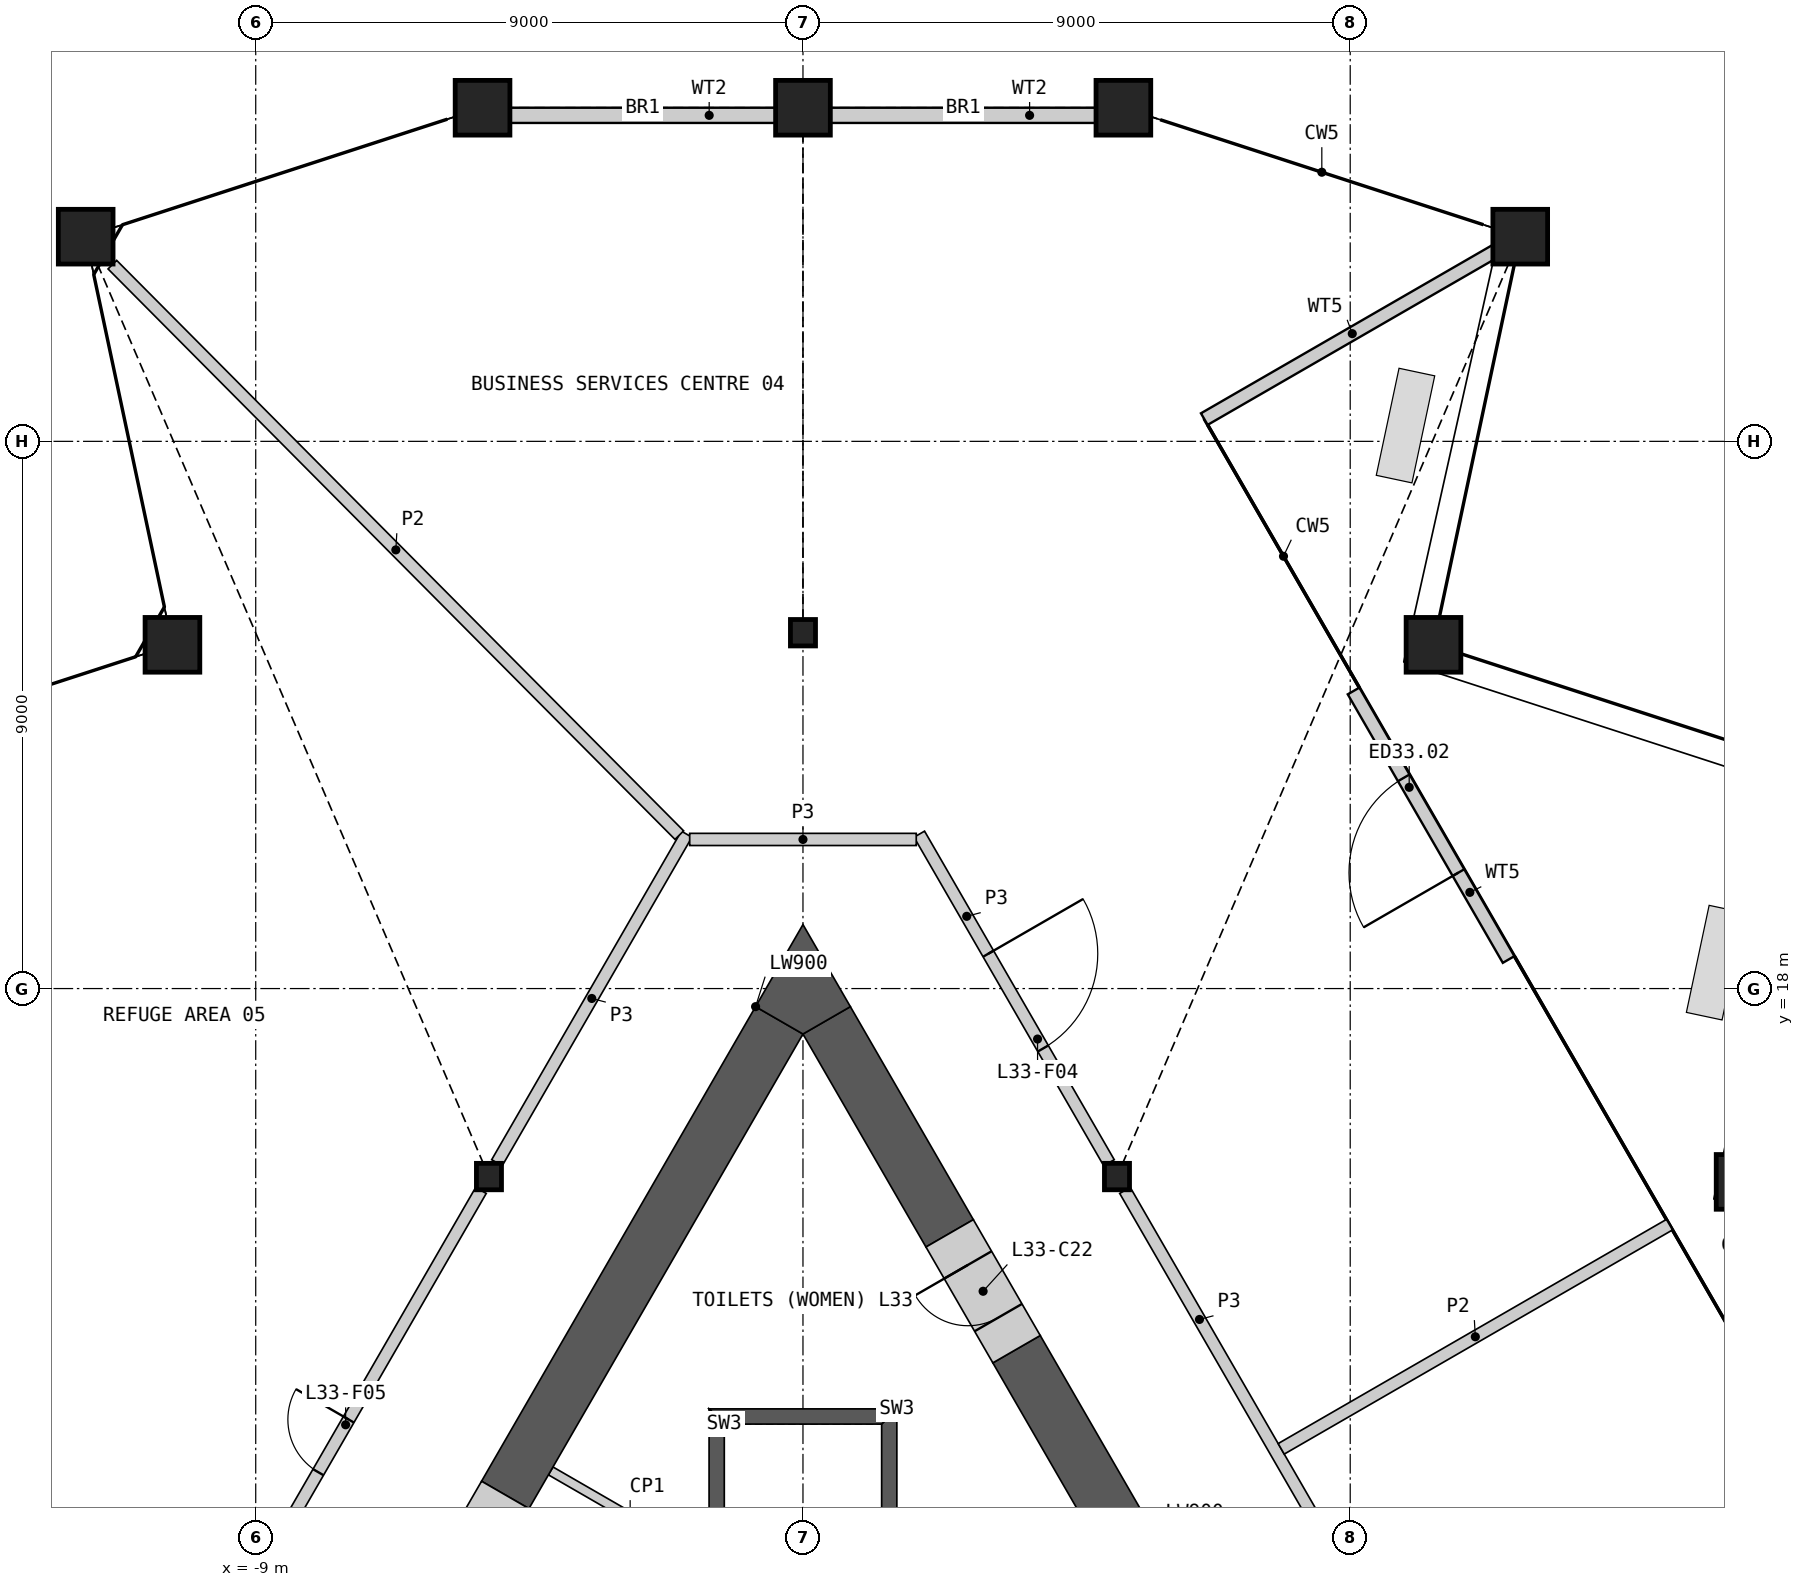
"""IFC4 building model, lengths in metres.
Left out: names, types, materials, properties, quantities, classifications, styles, units other than length and angle.
Written with IfcOpenShell. Run it as: python <this file> out.ifc"""

import sys

from ifc_helpers import new_model, si_unit, direction, frame, frame_2d, origin, origin_2d, place, context, subcontext, project, spatial, polyline, rectangle, hollow_rectangle, i_section, outline, extrude, element, fill, save


model = new_model("IFC4")
c1 = context("Model", 3, precision=1e-05, world=origin(), true_north=direction((0.0, 1.0)))
c2 = subcontext(c1, "Body", "Model", "MODEL_VIEW")
j1 = project(units=[si_unit("LENGTHUNIT", "METRE"), si_unit("PLANEANGLEUNIT", "RADIAN")], contexts=[c1])
p1 = place(None, origin())
s1 = spatial("IfcSite", under=j1, at=p1, CompositionType="ELEMENT")
p2 = place(p1, origin())
s2 = spatial("IfcBuilding", under=s1, at=p2, CompositionType="ELEMENT")
p3 = place(p2, frame((0.0, 0.0, 154.2)))
s3 = spatial("IfcBuildingStorey", under=s2, at=p3, CompositionType="ELEMENT", Elevation=154.2)
for number, where, z_axis, x_axis in (
    (1, (15.469, 14.82, 0.0), (0.0, 0.0, 1.0), (1.0, 0.0, 0.0)),
    (2, (10.37, 23.654, 0.0), (0.0, 0.0, 1.0), (1.0, 0.0, 0.0)),
    (3, (11.796, 30.366, 0.0), (0.0, 0.0, 1.0), (1.0, 0.0, 0.0)),
    (4, (5.27, 32.487, 0.0), (0.0, 0.0, 1.0), (1.0, 0.0, 0.0)),
    (5, (0.0, 32.487, 0.0), (0.0, 0.0, 1.0), (1.0, 0.0, 0.0)),
    (6, (-5.27, 32.487, 0.0), (0.0, 0.0, 1.0), (1.0, 0.0, 0.0)),
    (7, (-11.796, 30.366, 0.0), (0.0, 0.0, 1.0), (1.0, 0.0, 0.0)),
    (8, (-10.37, 23.654, 0.0), (0.0, 0.0, 1.0), (1.0, 0.0, 0.0)),
):
    element("IfcColumn", number, at=place(p3, frame(where, z_axis=z_axis, x_axis=x_axis)), inside=s3, PredefinedType="COLUMN", context=c2, shape_type="SweptSolid", body=[
        extrude(hollow_rectangle(XDim=0.9, YDim=0.9, WallThickness=0.06, at=origin_2d()), origin(), (0.0, 0.0, 1.0), 10.0),
    ])
for number, where, z_axis, x_axis in (
    (9, (0.0, 23.853, 0.0), (0.0, 0.0, 1.0), (1.0, 0.0, 0.0)),
    (10, (-5.164, 14.908, 0.0), (0.0, 0.0, 1.0), (1.0, 0.0, 0.0)),
    (11, (5.164, 14.908, 0.0), (0.0, 0.0, 1.0), (1.0, 0.0, 0.0)),
):
    element("IfcColumn", number, at=place(p3, frame(where, z_axis=z_axis, x_axis=x_axis)), inside=s3, PredefinedType="COLUMN", context=c2, shape_type="SweptSolid", body=[
        extrude(i_section(OverallWidth=0.412, OverallDepth=0.435, WebThickness=0.036, FlangeThickness=0.057, at=origin_2d()), origin(), (0.0, 0.0, 1.0), 10.0),
    ])
for number, where, z_axis, x_axis in (
    (12, (4.82, 32.362, 0.0), (0.0, 0.0, 1.0), (-1.0, 0.0, 0.0)),
    (13, (-0.45, 32.362, 0.0), (0.0, 0.0, 1.0), (-1.0, 0.0, 0.0)),
):
    element("IfcWall", number, at=place(p3, frame(where, z_axis=z_axis, x_axis=x_axis)), inside=s3, PredefinedType="SOLIDWALL", context=c2, shape_type="SweptSolid", body=[
        extrude(rectangle(XDim=4.37, YDim=0.25, at=frame_2d((2.185, 0.0))), origin(), (0.0, 0.0, 1.0), 8.989),
    ])
p4 = place(p3, frame((11.605, 18.478, 0.0), z_axis=(0.0, 0.0, 1.0), x_axis=(-0.500026340207, 0.866010195725, 0.0)))
e14 = element("IfcWall", 14, at=p4, inside=s3, PredefinedType="SOLIDWALL", context=c2, shape_type="SweptSolid", body=[
    extrude(rectangle(XDim=5.1, YDim=0.22, at=frame_2d((2.55, 0.0))), origin(), (0.0, 0.0, 1.0), 8.989),
])
p5 = place(p4, frame((1.65, 0.0, 0.0)))
e15 = element("IfcOpeningElement", 15, at=p5, cuts=e14, PredefinedType="OPENING", context=c2, shape_type="SweptSolid", body=[
    extrude(rectangle(XDim=1.8, YDim=2.4, at=frame_2d((0.9, 1.2))), frame((0.0, 0.12, 0.0), z_axis=(0.0, -1.0, 0.0), x_axis=(1.0, 0.0, 0.0)), (0.0, 0.0, 1.0), 0.24),
])
p6 = place(p3, frame((11.467, 30.176, 0.0), z_axis=(0.0, 0.0, 1.0), x_axis=(-0.866015577098, -0.500017019934, 0.0)))
e16 = element("IfcWall", 16, at=p6, inside=s3, PredefinedType="SOLIDWALL", context=c2, shape_type="SweptSolid", body=[
    extrude(rectangle(XDim=5.62, YDim=0.22, at=frame_2d((2.81, 0.0))), origin(), (0.0, 0.0, 1.0), 8.989),
])
p7 = place(p3, origin())
e17 = element("IfcWall", 17, at=p7, inside=s3, PredefinedType="SHEAR", context=c2, shape_type="SweptSolid", body=[
    extrude(outline(polyline([(1.544, 5.237), (1.544, 11.087), (1.294, 10.837), (1.294, 5.237), (1.544, 5.237)])), origin(), (0.0, 0.0, 1.0), 9.6),
])
p8 = place(p3, origin())
e18 = element("IfcWall", 18, at=p8, inside=s3, PredefinedType="SHEAR", context=c2, shape_type="SweptSolid", body=[
    extrude(outline(polyline([(1.544, 11.087), (-1.544, 11.087), (-1.294, 10.837), (1.294, 10.837), (1.544, 11.087)])), origin(), (0.0, 0.0, 1.0), 9.6),
])
p9 = place(p3, origin())
e19 = element("IfcWall", 19, at=p9, inside=s3, PredefinedType="SHEAR", context=c2, shape_type="SweptSolid", body=[
    extrude(outline(polyline([(-1.294, 10.837), (-1.544, 11.087), (-1.544, 5.237), (-1.294, 5.237), (-1.294, 10.837)])), origin(), (0.0, 0.0, 1.0), 9.6),
])
p10 = place(p3, frame((-4.149, 10.067, 0.0), z_axis=(0.0, 0.0, 1.0), x_axis=(0.865988872794, -0.500063268193, 0.0)))
e20 = element("IfcWall", 20, at=p10, inside=s3, PredefinedType="PARTITIONING", context=c2, shape_type="SweptSolid", body=[
    extrude(rectangle(XDim=3.018, YDim=0.15, at=frame_2d((1.509, 0.0))), origin(), (0.0, 0.0, 1.0), 9.6),
])
p11 = place(p3, frame((7.31, 5.491, 0.0), z_axis=(0.0, 0.0, 1.0), x_axis=(-0.499996970966, 0.866027152591, 0.0)))
e21 = element("IfcWall", 21, at=p11, inside=s3, PredefinedType="SHEAR", context=c2, shape_type="SweptSolid", body=[
    extrude(rectangle(XDim=7.596, YDim=0.9, at=frame_2d((3.798, 0.0))), origin(), (0.0, 0.0, 1.0), 9.6),
])
p12 = place(p3, frame((2.413, 13.974, 0.0), z_axis=(0.0, 0.0, 1.0), x_axis=(-0.500046330384, 0.865998653272, 0.0)))
e22 = element("IfcWall", 22, at=p12, inside=s3, PredefinedType="SHEAR", context=c2, shape_type="SweptSolid", body=[
    extrude(rectangle(XDim=4.045, YDim=0.9, at=frame_2d((2.023, 0.0))), origin(), (0.0, 0.0, 1.0), 9.6),
])
p13 = place(p3, frame((-0.39, 17.478, 0.0), z_axis=(0.0, 0.0, 1.0), x_axis=(-0.499999130374, -0.866025905863, 0.0)))
e23 = element("IfcWall", 23, at=p13, inside=s3, PredefinedType="SHEAR", context=c2, shape_type="SweptSolid", body=[
    extrude(rectangle(XDim=9.013, YDim=0.9, at=frame_2d((4.507, 0.0))), origin(), (0.0, 0.0, 1.0), 9.6),
])
p14 = place(p3, origin())
e24 = element("IfcWall", 24, at=p14, inside=s3, PredefinedType="SHEAR", context=c2, shape_type="SweptSolid", body=[
    extrude(outline(polyline([(-0.779, 17.703), (0.0, 19.052), (0.779, 17.703), (0.0, 17.253), (-0.779, 17.703)])), origin(), (0.0, 0.0, 1.0), 9.6),
])
p15 = place(p3, frame((-4.896, 9.672, 0.0), z_axis=(0.0, 0.0, 1.0), x_axis=(-0.50002983664, -0.866008176907, 0.0)))
e25 = element("IfcWall", 25, at=p15, inside=s3, PredefinedType="SHEAR", context=c2, shape_type="SweptSolid", body=[
    extrude(rectangle(XDim=2.2, YDim=0.9, at=frame_2d((1.1, 0.0))), origin(), (0.0, 0.0, 1.0), 9.6),
])
p16 = place(p15, frame((0.6, 0.0, 0.0)))
e26 = element("IfcOpeningElement", 26, at=p16, cuts=e25, PredefinedType="OPENING", context=c2, shape_type="SweptSolid", body=[
    extrude(rectangle(XDim=1.0, YDim=2.1, at=frame_2d((0.5, 1.05))), frame((0.0, 0.46, 0.0), z_axis=(0.0, -1.0, 0.0), x_axis=(1.0, 0.0, 0.0)), (0.0, 0.0, 1.0), 0.92),
])
p17 = place(p3, frame((3.512, 12.069, 0.0), z_axis=(0.0, 0.0, 1.0), x_axis=(-0.499946605688, 0.86605622881, 0.0)))
e27 = element("IfcWall", 27, at=p17, inside=s3, PredefinedType="SHEAR", context=c2, shape_type="SweptSolid", body=[
    extrude(rectangle(XDim=2.2, YDim=0.9, at=frame_2d((1.1, 0.0))), origin(), (0.0, 0.0, 1.0), 9.6),
])
p18 = place(p17, frame((0.6, 0.0, 0.0)))
e28 = element("IfcOpeningElement", 28, at=p18, cuts=e27, PredefinedType="OPENING", context=c2, shape_type="SweptSolid", body=[
    extrude(rectangle(XDim=1.0, YDim=2.1, at=frame_2d((0.5, 1.05))), frame((0.0, 0.46, 0.0), z_axis=(0.0, -1.0, 0.0), x_axis=(1.0, 0.0, 0.0)), (0.0, 0.0, 1.0), 0.92),
])
p19 = place(p3, frame((-10.197, 6.19, 0.0), z_axis=(0.0, 0.0, 1.0), x_axis=(0.500012035596, 0.866018454918, 0.0)))
e29 = element("IfcWall", 29, at=p19, inside=s3, PredefinedType="PARTITIONING", context=c2, shape_type="SweptSolid", body=[
    extrude(rectangle(XDim=9.803, YDim=0.2, at=frame_2d((4.902, 0.0))), origin(), (0.0, 0.0, 1.0), 9.6),
])
p20 = place(p19, frame((4.452, 0.0, 0.0)))
e30 = element("IfcOpeningElement", 30, at=p20, cuts=e29, PredefinedType="OPENING", context=c2, shape_type="SweptSolid", body=[
    extrude(rectangle(XDim=1.0, YDim=2.1, at=frame_2d((0.5, 1.05))), frame((0.0, 0.11, 0.0), z_axis=(0.0, -1.0, 0.0), x_axis=(1.0, 0.0, 0.0)), (0.0, 0.0, 1.0), 0.22),
])
p21 = place(p3, frame((5.295, 14.68, 0.0), z_axis=(0.0, 0.0, 1.0), x_axis=(0.500012035596, -0.866018454918, 0.0)))
e31 = element("IfcWall", 31, at=p21, inside=s3, PredefinedType="PARTITIONING", context=c2, shape_type="SweptSolid", body=[
    extrude(rectangle(XDim=9.803, YDim=0.2, at=frame_2d((4.902, 0.0))), origin(), (0.0, 0.0, 1.0), 9.6),
])
p22 = place(p3, frame((-5.033, 15.135, 0.0), z_axis=(0.0, 0.0, 1.0), x_axis=(0.499980978912, 0.866036385336, 0.0)))
e32 = element("IfcWall", 32, at=p22, inside=s3, PredefinedType="PARTITIONING", context=c2, shape_type="SweptSolid", body=[
    extrude(rectangle(XDim=6.24, YDim=0.2, at=frame_2d((3.12, 0.0))), origin(), (0.0, 0.0, 1.0), 9.6),
])
p23 = place(p3, frame((1.913, 20.539, 0.0), z_axis=(0.0, 0.0, 1.0), x_axis=(0.499980978912, -0.866036385336, 0.0)))
e33 = element("IfcWall", 33, at=p23, inside=s3, PredefinedType="PARTITIONING", context=c2, shape_type="SweptSolid", body=[
    extrude(rectangle(XDim=6.24, YDim=0.2, at=frame_2d((3.12, 0.0))), origin(), (0.0, 0.0, 1.0), 9.6),
])
p24 = place(p23, frame((2.271, 0.0, 0.0)))
e34 = element("IfcOpeningElement", 34, at=p24, cuts=e33, PredefinedType="OPENING", context=c2, shape_type="SweptSolid", body=[
    extrude(rectangle(XDim=1.8, YDim=2.1, at=frame_2d((0.9, 1.05))), frame((0.0, 0.11, 0.0), z_axis=(0.0, -1.0, 0.0), x_axis=(1.0, 0.0, 0.0)), (0.0, 0.0, 1.0), 0.22),
])
p25 = place(p3, frame((-1.863, 20.453, 0.0), z_axis=(0.0, 0.0, 1.0), x_axis=(1.0, 0.0, 0.0)))
e35 = element("IfcWall", 35, at=p25, inside=s3, PredefinedType="PARTITIONING", context=c2, shape_type="SweptSolid", body=[
    extrude(rectangle(XDim=3.726, YDim=0.2, at=frame_2d((1.863, 0.0))), origin(), (0.0, 0.0, 1.0), 9.6),
])
p26 = place(p3, frame((-11.358, 29.906, 0.0), z_axis=(0.0, 0.0, 1.0), x_axis=(0.704897825138, -0.709308858055, 0.0)))
e36 = element("IfcWall", 36, at=p26, inside=s3, PredefinedType="PARTITIONING", context=c2, shape_type="SweptSolid", body=[
    extrude(rectangle(XDim=13.228, YDim=0.2, at=frame_2d((6.614, 0.0))), origin(), (0.0, 0.0, 1.0), 8.685),
])
p27 = place(p3, frame((7.865, 10.43, 0.0), z_axis=(0.0, 0.0, 1.0), x_axis=(0.866025675355, 0.499999529627, 0.0)))
e37 = element("IfcWall", 37, at=p27, inside=s3, PredefinedType="PARTITIONING", context=c2, shape_type="SweptSolid", body=[
    extrude(rectangle(XDim=7.373, YDim=0.2, at=frame_2d((3.687, 0.0))), origin(), (0.0, 0.0, 1.0), 8.685),
])
p28 = place(p5, origin())
e38 = element("IfcDoor", 38, at=p28, inside=s3, OperationType="DOUBLE_DOOR_SINGLE_SWING", PredefinedType="DOOR", context=c2, shape_type="SweptSolid", body=[
    extrude(rectangle(XDim=1.8, YDim=2.4, at=frame_2d((0.9, 1.2))), frame((0.0, 0.025, 0.0), z_axis=(0.0, -1.0, 0.0), x_axis=(1.0, 0.0, 0.0)), (0.0, 0.0, 1.0), 0.05),
])
fill(e15, e38)
p29 = place(p18, origin())
e39 = element("IfcDoor", 39, at=p29, inside=s3, OperationType="SINGLE_SWING_RIGHT", PredefinedType="DOOR", context=c2, shape_type="SweptSolid", body=[
    extrude(rectangle(XDim=1.0, YDim=2.1, at=frame_2d((0.5, 1.05))), frame((0.0, 0.205, 0.0), z_axis=(0.0, -1.0, 0.0), x_axis=(1.0, 0.0, 0.0)), (0.0, 0.0, 1.0), 0.05),
])
fill(e28, e39)
p30 = place(p24, origin())
e40 = element("IfcDoor", 40, at=p30, inside=s3, OperationType="DOUBLE_DOOR_SINGLE_SWING", PredefinedType="DOOR", context=c2, shape_type="SweptSolid", body=[
    extrude(rectangle(XDim=1.8, YDim=2.1, at=frame_2d((0.9, 1.05))), frame((0.0, 0.025, 0.0), z_axis=(0.0, -1.0, 0.0), x_axis=(1.0, 0.0, 0.0)), (0.0, 0.0, 1.0), 0.05),
])
fill(e34, e40)
p31 = place(p20, origin())
e41 = element("IfcDoor", 41, at=p31, inside=s3, OperationType="SINGLE_SWING_RIGHT", PredefinedType="DOOR", context=c2, shape_type="SweptSolid", body=[
    extrude(rectangle(XDim=1.0, YDim=2.1, at=frame_2d((0.5, 1.05))), frame((0.0, 0.025, 0.0), z_axis=(0.0, -1.0, 0.0), x_axis=(1.0, 0.0, 0.0)), (0.0, 0.0, 1.0), 0.05),
])
fill(e30, e41)
save(model, sys.argv[1])
